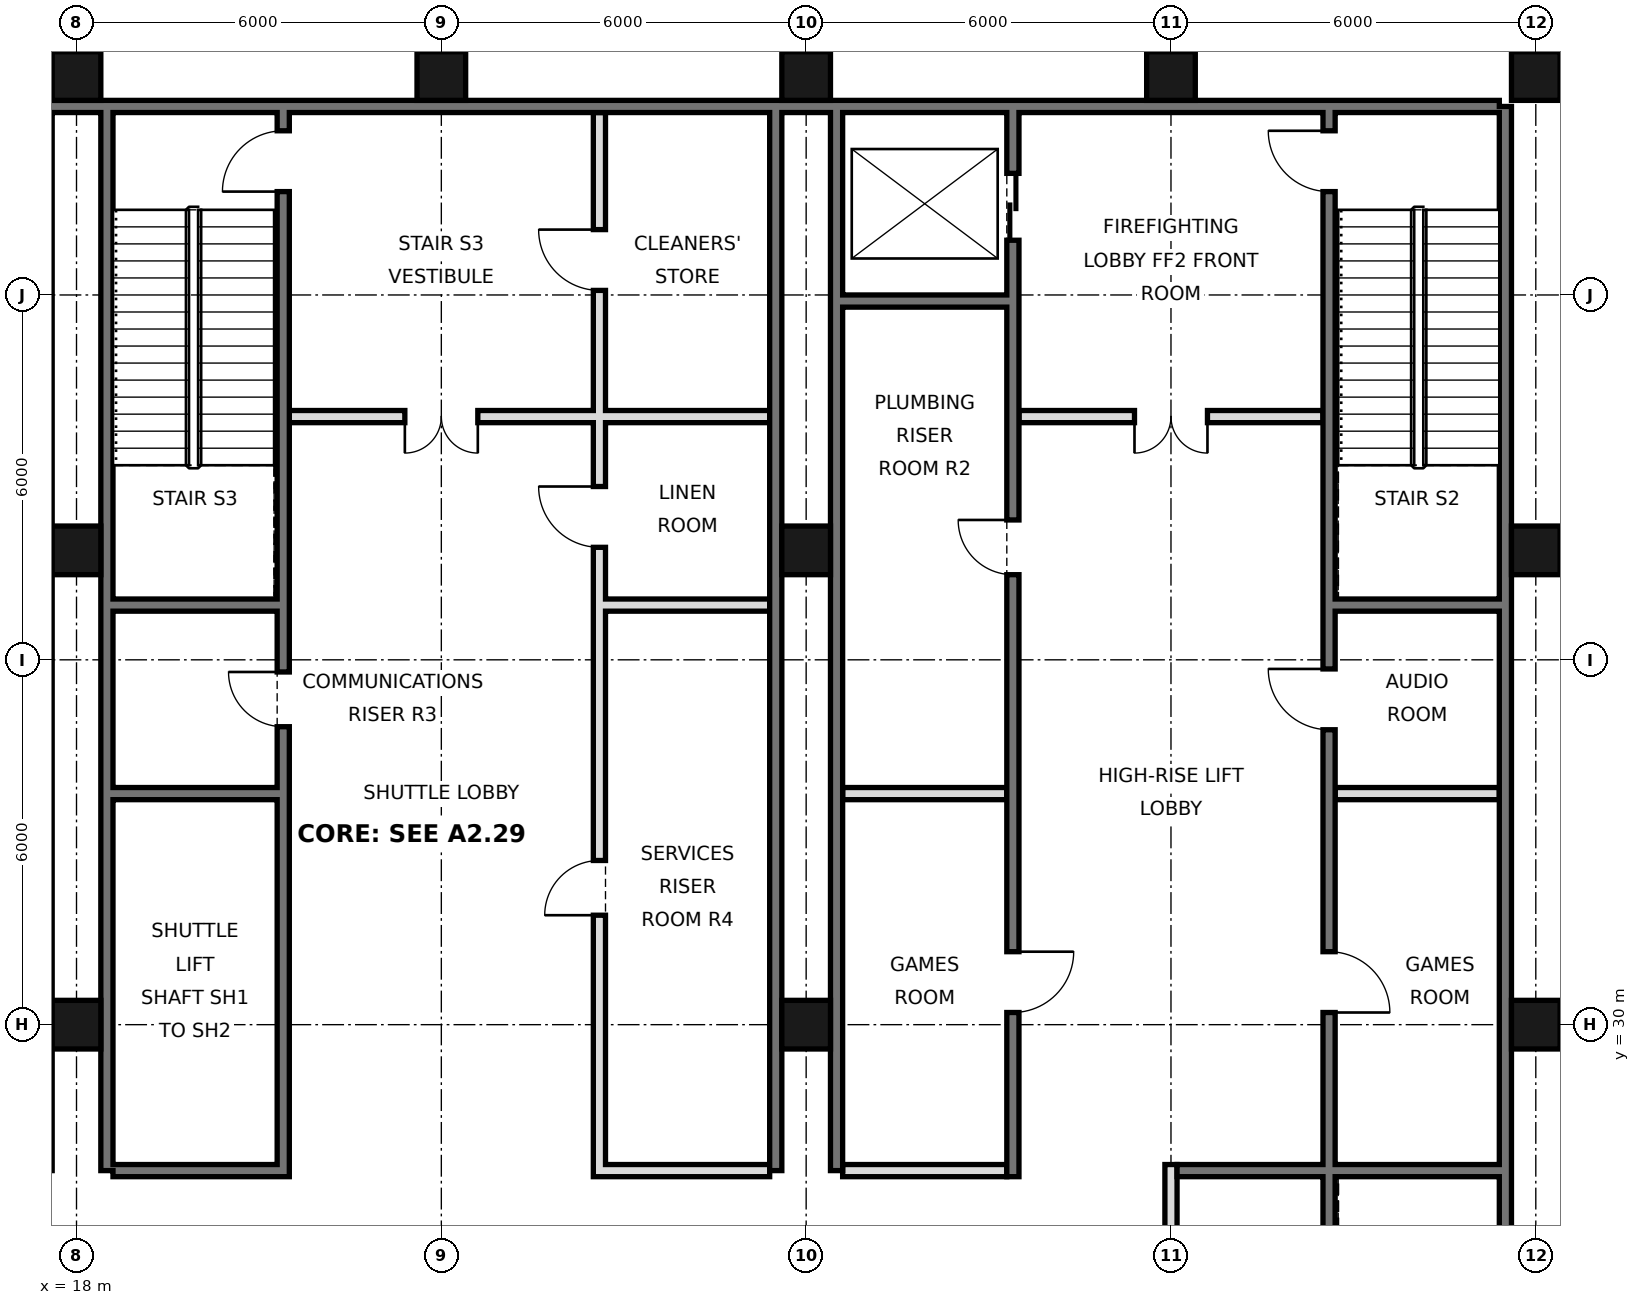
"""IFC4 building model, lengths in metres.
Left out: names, types, materials, properties, quantities, classifications, styles, units other than length and angle.
Written with IfcOpenShell. Run it as: python <this file> out.ifc"""

import sys

from ifc_helpers import new_model, si_unit, direction, frame, frame_2d, origin, origin_2d, place, context, subcontext, project, spatial, rectangle, hollow_rectangle, extrude, element, fill, save


model = new_model("IFC4")
c1 = context("Model", 3, precision=1e-05, world=origin(), true_north=direction((0.0, 1.0)))
c2 = subcontext(c1, "Body", "Model", "MODEL_VIEW")
j1 = project(units=[si_unit("LENGTHUNIT", "METRE"), si_unit("PLANEANGLEUNIT", "RADIAN")], contexts=[c1])
p1 = place(None, origin())
s1 = spatial("IfcSite", under=j1, at=p1, CompositionType="ELEMENT")
p2 = place(p1, origin())
s2 = spatial("IfcBuilding", under=s1, at=p2, CompositionType="ELEMENT")
p3 = place(p2, frame((0.0, 0.0, 114.2)))
s3 = spatial("IfcBuildingStorey", under=s2, at=p3, CompositionType="ELEMENT", Elevation=114.2)
for number, where, z_axis, x_axis in (
    (1, (18.0, 30.0, 0.0), (0.0, 0.0, 1.0), (1.0, 0.0, 0.0)),
    (2, (18.0, 37.8, 0.0), (0.0, 0.0, 1.0), (1.0, 0.0, 0.0)),
    (3, (18.0, 45.6, 0.0), (0.0, 0.0, 1.0), (1.0, 0.0, 0.0)),
    (4, (24.0, 45.6, 0.0), (0.0, 0.0, 1.0), (1.0, 0.0, 0.0)),
    (5, (30.0, 30.0, 0.0), (0.0, 0.0, 1.0), (1.0, 0.0, 0.0)),
    (6, (30.0, 37.8, 0.0), (0.0, 0.0, 1.0), (1.0, 0.0, 0.0)),
    (7, (30.0, 45.6, 0.0), (0.0, 0.0, 1.0), (1.0, 0.0, 0.0)),
    (8, (36.0, 45.6, 0.0), (0.0, 0.0, 1.0), (1.0, 0.0, 0.0)),
    (9, (42.0, 30.0, 0.0), (0.0, 0.0, 1.0), (1.0, 0.0, 0.0)),
    (10, (42.0, 37.8, 0.0), (0.0, 0.0, 1.0), (1.0, 0.0, 0.0)),
    (11, (42.0, 45.6, 0.0), (0.0, 0.0, 1.0), (1.0, 0.0, 0.0)),
):
    element("IfcColumn", number, at=place(p3, frame(where, z_axis=z_axis, x_axis=x_axis)), inside=s3, PredefinedType="COLUMN", context=c2, shape_type="SweptSolid", body=[
        extrude(hollow_rectangle(XDim=0.8, YDim=0.8, WallThickness=0.05, at=origin_2d()), origin(), (0.0, 0.0, 1.0), 5.4),
    ])
p4 = place(p3, frame((41.5, 21.6, 0.0), z_axis=(0.0, 0.0, 1.0), x_axis=(0.0, 1.0, 0.0)))
e12 = element("IfcWall", 12, at=p4, inside=s3, PredefinedType="SOLIDWALL", context=c2, shape_type="SweptSolid", body=[
    extrude(rectangle(XDim=23.5, YDim=0.2, at=frame_2d((11.75, 0.0))), origin(), (0.0, 0.0, 1.0), 5.22),
])
p5 = place(p3, frame((6.6, 45.1, 0.0), z_axis=(0.0, 0.0, 1.0), x_axis=(1.0, 0.0, 0.0)))
e13 = element("IfcWall", 13, at=p5, inside=s3, PredefinedType="SOLIDWALL", context=c2, shape_type="SweptSolid", body=[
    extrude(rectangle(XDim=34.8, YDim=0.2, at=frame_2d((17.4, 0.0))), origin(), (0.0, 0.0, 1.0), 5.22),
])
for number, where, z_axis, x_axis in (
    (14, (18.5, 27.6, 0.0), (0.0, 0.0, 1.0), (0.0, 1.0, 0.0)),
    (15, (29.5, 27.6, 0.0), (0.0, 0.0, 1.0), (0.0, 1.0, 0.0)),
    (16, (30.5, 27.6, 0.0), (0.0, 0.0, 1.0), (0.0, 1.0, 0.0)),
):
    element("IfcWall", number, at=place(p3, frame(where, z_axis=z_axis, x_axis=x_axis)), inside=s3, PredefinedType="SOLIDWALL", context=c2, shape_type="SweptSolid", body=[
        extrude(rectangle(XDim=17.5, YDim=0.2, at=frame_2d((8.75, 0.0))), origin(), (0.0, 0.0, 1.0), 5.22),
    ])
p6 = place(p3, frame((21.4, 27.5, 0.0), z_axis=(0.0, 0.0, 1.0), x_axis=(0.0, 1.0, 0.0)))
e17 = element("IfcWall", 17, at=p6, inside=s3, PredefinedType="SOLIDWALL", context=c2, shape_type="SweptSolid", body=[
    extrude(rectangle(XDim=17.5, YDim=0.2, at=frame_2d((8.75, 0.0))), origin(), (0.0, 0.0, 1.0), 5.22),
])
p7 = place(p6, frame((16.2, 0.0, 0.0)))
e18 = element("IfcOpeningElement", 18, at=p7, cuts=e17, PredefinedType="OPENING", context=c2, shape_type="SweptSolid", body=[
    extrude(rectangle(XDim=1.0, YDim=2.1, at=frame_2d((0.5, 1.05))), frame((0.0, 0.11, 0.0), z_axis=(0.0, -1.0, 0.0), x_axis=(1.0, 0.0, 0.0)), (0.0, 0.0, 1.0), 0.22),
])
p8 = place(p6, frame((7.4, 0.0, 0.0)))
e19 = element("IfcOpeningElement", 19, at=p8, cuts=e17, PredefinedType="OPENING", context=c2, shape_type="SweptSolid", body=[
    extrude(rectangle(XDim=0.9, YDim=2.1, at=frame_2d((0.45, 1.05))), frame((0.0, 0.11, 0.0), z_axis=(0.0, -1.0, 0.0), x_axis=(1.0, 0.0, 0.0)), (0.0, 0.0, 1.0), 0.22),
])
p9 = place(p3, frame((26.6, 27.5, 0.0), z_axis=(0.0, 0.0, 1.0), x_axis=(0.0, 1.0, 0.0)))
e20 = element("IfcWall", 20, at=p9, inside=s3, PredefinedType="SOLIDWALL", context=c2, shape_type="SweptSolid", body=[
    extrude(rectangle(XDim=17.5, YDim=0.2, at=frame_2d((8.75, 0.0))), origin(), (0.0, 0.0, 1.0), 5.22),
])
p10 = place(p9, frame((4.3, 0.0, 0.0)))
e21 = element("IfcOpeningElement", 21, at=p10, cuts=e20, PredefinedType="OPENING", context=c2, shape_type="SweptSolid", body=[
    extrude(rectangle(XDim=0.9, YDim=2.1, at=frame_2d((0.45, 1.05))), frame((0.0, 0.11, 0.0), z_axis=(0.0, -1.0, 0.0), x_axis=(1.0, 0.0, 0.0)), (0.0, 0.0, 1.0), 0.22),
])
p11 = place(p9, frame((10.35, 0.0, 0.0)))
e22 = element("IfcOpeningElement", 22, at=p11, cuts=e20, PredefinedType="OPENING", context=c2, shape_type="SweptSolid", body=[
    extrude(rectangle(XDim=1.0, YDim=2.1, at=frame_2d((0.5, 1.05))), frame((0.0, 0.11, 0.0), z_axis=(0.0, -1.0, 0.0), x_axis=(1.0, 0.0, 0.0)), (0.0, 0.0, 1.0), 0.22),
])
p12 = place(p9, frame((14.575, 0.0, 0.0)))
e23 = element("IfcOpeningElement", 23, at=p12, cuts=e20, PredefinedType="OPENING", context=c2, shape_type="SweptSolid", body=[
    extrude(rectangle(XDim=1.0, YDim=2.1, at=frame_2d((0.5, 1.05))), frame((0.0, 0.11, 0.0), z_axis=(0.0, -1.0, 0.0), x_axis=(1.0, 0.0, 0.0)), (0.0, 0.0, 1.0), 0.22),
])
p13 = place(p3, frame((33.4, 27.5, 0.0), z_axis=(0.0, 0.0, 1.0), x_axis=(0.0, 1.0, 0.0)))
e24 = element("IfcWall", 24, at=p13, inside=s3, PredefinedType="SOLIDWALL", context=c2, shape_type="SweptSolid", body=[
    extrude(rectangle(XDim=17.5, YDim=0.2, at=frame_2d((8.75, 0.0))), origin(), (0.0, 0.0, 1.0), 5.22),
])
p14 = place(p13, frame((15.4, 0.0, 0.0)))
e25 = element("IfcOpeningElement", 25, at=p14, cuts=e24, PredefinedType="OPENING", context=c2, shape_type="SweptSolid", body=[
    extrude(rectangle(XDim=1.1, YDim=2.1, at=frame_2d((0.55, 1.05))), frame((0.0, 0.11, 0.0), z_axis=(0.0, -1.0, 0.0), x_axis=(1.0, 0.0, 0.0)), (0.0, 0.0, 1.0), 0.22),
])
p15 = place(p13, frame((2.7, 0.0, 0.0)))
e26 = element("IfcOpeningElement", 26, at=p15, cuts=e24, PredefinedType="OPENING", context=c2, shape_type="SweptSolid", body=[
    extrude(rectangle(XDim=1.0, YDim=2.1, at=frame_2d((0.5, 1.05))), frame((0.0, 0.11, 0.0), z_axis=(0.0, -1.0, 0.0), x_axis=(1.0, 0.0, 0.0)), (0.0, 0.0, 1.0), 0.22),
])
p16 = place(p13, frame((9.9, 0.0, 0.0)))
e27 = element("IfcOpeningElement", 27, at=p16, cuts=e24, PredefinedType="OPENING", context=c2, shape_type="SweptSolid", body=[
    extrude(rectangle(XDim=0.9, YDim=2.1, at=frame_2d((0.45, 1.05))), frame((0.0, 0.11, 0.0), z_axis=(0.0, -1.0, 0.0), x_axis=(1.0, 0.0, 0.0)), (0.0, 0.0, 1.0), 0.22),
])
p17 = place(p3, frame((36.0, 21.6, 0.0), z_axis=(0.0, 0.0, 1.0), x_axis=(0.0, 1.0, 0.0)))
e28 = element("IfcWall", 28, at=p17, inside=s3, PredefinedType="PARTITIONING", context=c2, shape_type="SweptSolid", body=[
    extrude(rectangle(XDim=6.1, YDim=0.2, at=frame_2d((3.05, 0.0))), origin(), (0.0, 0.0, 1.0), 5.22),
])
p18 = place(p3, frame((38.6, 21.6, 0.0), z_axis=(0.0, 0.0, 1.0), x_axis=(0.0, 1.0, 0.0)))
e29 = element("IfcWall", 29, at=p18, inside=s3, PredefinedType="SOLIDWALL", context=c2, shape_type="SweptSolid", body=[
    extrude(rectangle(XDim=23.4, YDim=0.2, at=frame_2d((11.7, 0.0))), origin(), (0.0, 0.0, 1.0), 5.22),
])
p19 = place(p18, frame((8.6, 0.0, 0.0)))
e30 = element("IfcOpeningElement", 30, at=p19, cuts=e29, PredefinedType="OPENING", context=c2, shape_type="SweptSolid", body=[
    extrude(rectangle(XDim=1.0, YDim=2.1, at=frame_2d((0.5, 1.05))), frame((0.0, 0.11, 0.0), z_axis=(0.0, -1.0, 0.0), x_axis=(1.0, 0.0, 0.0)), (0.0, 0.0, 1.0), 0.22),
])
p20 = place(p18, frame((13.25, 0.0, 0.0)))
e31 = element("IfcOpeningElement", 31, at=p20, cuts=e29, PredefinedType="OPENING", context=c2, shape_type="SweptSolid", body=[
    extrude(rectangle(XDim=1.0, YDim=2.1, at=frame_2d((0.5, 1.05))), frame((0.0, 0.11, 0.0), z_axis=(0.0, -1.0, 0.0), x_axis=(1.0, 0.0, 0.0)), (0.0, 0.0, 1.0), 0.22),
])
p21 = place(p18, frame((22.1, 0.0, 0.0)))
e32 = element("IfcOpeningElement", 32, at=p21, cuts=e29, PredefinedType="OPENING", context=c2, shape_type="SweptSolid", body=[
    extrude(rectangle(XDim=1.0, YDim=2.1, at=frame_2d((0.5, 1.05))), frame((0.0, 0.11, 0.0), z_axis=(0.0, -1.0, 0.0), x_axis=(1.0, 0.0, 0.0)), (0.0, 0.0, 1.0), 0.22),
])
p22 = place(p18, frame((0.175, 0.0, 0.0)))
e33 = element("IfcOpeningElement", 33, at=p22, cuts=e29, PredefinedType="OPENING", context=c2, shape_type="SweptSolid", body=[
    extrude(rectangle(XDim=0.9, YDim=2.1, at=frame_2d((0.45, 1.05))), frame((0.0, 0.11, 0.0), z_axis=(0.0, -1.0, 0.0), x_axis=(1.0, 0.0, 0.0)), (0.0, 0.0, 1.0), 0.22),
])
for number, where, z_axis, x_axis in (
    (34, (18.6, 27.6, 0.0), (0.0, 0.0, 1.0), (1.0, 0.0, 0.0)),
    (35, (26.7, 27.6, 0.0), (0.0, 0.0, 1.0), (1.0, 0.0, 0.0)),
):
    element("IfcWall", number, at=place(p3, frame(where, z_axis=z_axis, x_axis=x_axis)), inside=s3, PredefinedType="SOLIDWALL", context=c2, shape_type="SweptSolid", body=[
        extrude(rectangle(XDim=2.7, YDim=0.2, at=frame_2d((1.35, 0.0))), origin(), (0.0, 0.0, 1.0), 5.22),
    ])
p23 = place(p3, frame((30.6, 27.6, 0.0), z_axis=(0.0, 0.0, 1.0), x_axis=(1.0, 0.0, 0.0)))
e36 = element("IfcWall", 36, at=p23, inside=s3, PredefinedType="PARTITIONING", context=c2, shape_type="SweptSolid", body=[
    extrude(rectangle(XDim=2.7, YDim=0.2, at=frame_2d((1.35, 0.0))), origin(), (0.0, 0.0, 1.0), 5.22),
])
p24 = place(p3, frame((36.1, 27.6, 0.0), z_axis=(0.0, 0.0, 1.0), x_axis=(1.0, 0.0, 0.0)))
e37 = element("IfcWall", 37, at=p24, inside=s3, PredefinedType="SOLIDWALL", context=c2, shape_type="SweptSolid", body=[
    extrude(rectangle(XDim=5.3, YDim=0.2, at=frame_2d((2.65, 0.0))), origin(), (0.0, 0.0, 1.0), 5.22),
])
for number, where, z_axis, x_axis in (
    (38, (18.6, 33.8, 0.0), (0.0, 0.0, 1.0), (1.0, 0.0, 0.0)),
    (39, (30.6, 33.8, 0.0), (0.0, 0.0, 1.0), (1.0, 0.0, 0.0)),
):
    element("IfcWall", number, at=place(p3, frame(where, z_axis=z_axis, x_axis=x_axis)), inside=s3, PredefinedType="SOLIDWALL", context=c2, shape_type="SweptSolid", body=[
        extrude(rectangle(XDim=2.7, YDim=0.2, at=frame_2d((1.35, 0.0))), origin(), (0.0, 0.0, 1.0), 5.22),
    ])
p25 = place(p3, frame((38.7, 33.8, 0.0), z_axis=(0.0, 0.0, 1.0), x_axis=(1.0, 0.0, 0.0)))
e40 = element("IfcWall", 40, at=p25, inside=s3, PredefinedType="PARTITIONING", context=c2, shape_type="SweptSolid", body=[
    extrude(rectangle(XDim=2.7, YDim=0.2, at=frame_2d((1.35, 0.0))), origin(), (0.0, 0.0, 1.0), 5.22),
])
for number, where, z_axis, x_axis in (
    (41, (18.6, 36.9, 0.0), (0.0, 0.0, 1.0), (1.0, 0.0, 0.0)),
    (42, (26.7, 36.9, 0.0), (0.0, 0.0, 1.0), (1.0, 0.0, 0.0)),
    (43, (38.7, 36.9, 0.0), (0.0, 0.0, 1.0), (1.0, 0.0, 0.0)),
):
    element("IfcWall", number, at=place(p3, frame(where, z_axis=z_axis, x_axis=x_axis)), inside=s3, PredefinedType="SOLIDWALL", context=c2, shape_type="SweptSolid", body=[
        extrude(rectangle(XDim=2.7, YDim=0.2, at=frame_2d((1.35, 0.0))), origin(), (0.0, 0.0, 1.0), 5.22),
    ])
p26 = place(p3, frame((21.5, 40.0, 0.0), z_axis=(0.0, 0.0, 1.0), x_axis=(1.0, 0.0, 0.0)))
e44 = element("IfcWall", 44, at=p26, inside=s3, PredefinedType="PARTITIONING", context=c2, shape_type="SweptSolid", body=[
    extrude(rectangle(XDim=7.9, YDim=0.2, at=frame_2d((3.95, 0.0))), origin(), (0.0, 0.0, 1.0), 5.22),
])
p27 = place(p26, frame((1.9, 0.0, 0.0)))
e45 = element("IfcOpeningElement", 45, at=p27, cuts=e44, PredefinedType="OPENING", context=c2, shape_type="SweptSolid", body=[
    extrude(rectangle(XDim=1.2, YDim=2.1, at=frame_2d((0.6, 1.05))), frame((0.0, 0.11, 0.0), z_axis=(0.0, -1.0, 0.0), x_axis=(1.0, 0.0, 0.0)), (0.0, 0.0, 1.0), 0.22),
])
p28 = place(p3, frame((33.5, 40.0, 0.0), z_axis=(0.0, 0.0, 1.0), x_axis=(1.0, 0.0, 0.0)))
e46 = element("IfcWall", 46, at=p28, inside=s3, PredefinedType="PARTITIONING", context=c2, shape_type="SweptSolid", body=[
    extrude(rectangle(XDim=5.0, YDim=0.2, at=frame_2d((2.5, 0.0))), origin(), (0.0, 0.0, 1.0), 5.22),
])
p29 = place(p28, frame((1.9, 0.0, 0.0)))
e47 = element("IfcOpeningElement", 47, at=p29, cuts=e46, PredefinedType="OPENING", context=c2, shape_type="SweptSolid", body=[
    extrude(rectangle(XDim=1.2, YDim=2.1, at=frame_2d((0.6, 1.05))), frame((0.0, 0.11, 0.0), z_axis=(0.0, -1.0, 0.0), x_axis=(1.0, 0.0, 0.0)), (0.0, 0.0, 1.0), 0.22),
])
p30 = place(p3, frame((30.6, 41.9, 0.0), z_axis=(0.0, 0.0, 1.0), x_axis=(1.0, 0.0, 0.0)))
e48 = element("IfcWall", 48, at=p30, inside=s3, PredefinedType="SOLIDWALL", context=c2, shape_type="SweptSolid", body=[
    extrude(rectangle(XDim=2.7, YDim=0.2, at=frame_2d((1.35, 0.0))), origin(), (0.0, 0.0, 1.0), 5.22),
])
p31 = place(p27, frame((1.2, 0.0, 0.0), z_axis=(0.0, 0.0, 1.0), x_axis=(-1.0, 0.0, 0.0)))
e49 = element("IfcDoor", 49, at=p31, inside=s3, OperationType="DOUBLE_DOOR_SINGLE_SWING", PredefinedType="DOOR", context=c2, shape_type="SweptSolid", body=[
    extrude(rectangle(XDim=1.2, YDim=2.1, at=frame_2d((0.6, 1.05))), frame((0.0, 0.025, 0.0), z_axis=(0.0, -1.0, 0.0), x_axis=(1.0, 0.0, 0.0)), (0.0, 0.0, 1.0), 0.05),
])
fill(e45, e49)
p32 = place(p29, frame((1.2, 0.0, 0.0), z_axis=(0.0, 0.0, 1.0), x_axis=(-1.0, 0.0, 0.0)))
e50 = element("IfcDoor", 50, at=p32, inside=s3, OperationType="DOUBLE_DOOR_SINGLE_SWING", PredefinedType="DOOR", context=c2, shape_type="SweptSolid", body=[
    extrude(rectangle(XDim=1.2, YDim=2.1, at=frame_2d((0.6, 1.05))), frame((0.0, 0.025, 0.0), z_axis=(0.0, -1.0, 0.0), x_axis=(1.0, 0.0, 0.0)), (0.0, 0.0, 1.0), 0.05),
])
fill(e47, e50)
p33 = place(p14, origin())
e51 = element("IfcDoor", 51, at=p33, inside=s3, OperationType="DOUBLE_DOOR_SLIDING", PredefinedType="DOOR", context=c2, shape_type="SweptSolid", body=[
    extrude(rectangle(XDim=1.1, YDim=2.1, at=frame_2d((0.55, 1.05))), frame((0.0, 0.025, 0.0), z_axis=(0.0, -1.0, 0.0), x_axis=(1.0, 0.0, 0.0)), (0.0, 0.0, 1.0), 0.05),
])
fill(e25, e51)
p34 = place(p19, frame((1.0, 0.0, 0.0), z_axis=(0.0, 0.0, 1.0), x_axis=(-1.0, 0.0, 0.0)))
e52 = element("IfcDoor", 52, at=p34, inside=s3, OperationType="SINGLE_SWING_RIGHT", PredefinedType="DOOR", context=c2, shape_type="SweptSolid", body=[
    extrude(rectangle(XDim=1.0, YDim=2.1, at=frame_2d((0.5, 1.05))), frame((0.0, 0.025, 0.0), z_axis=(0.0, -1.0, 0.0), x_axis=(1.0, 0.0, 0.0)), (0.0, 0.0, 1.0), 0.05),
])
fill(e30, e52)
p35 = place(p20, frame((1.0, 0.0, 0.0), z_axis=(0.0, 0.0, 1.0), x_axis=(-1.0, 0.0, 0.0)))
e53 = element("IfcDoor", 53, at=p35, inside=s3, OperationType="SINGLE_SWING_LEFT", PredefinedType="DOOR", context=c2, shape_type="SweptSolid", body=[
    extrude(rectangle(XDim=1.0, YDim=2.1, at=frame_2d((0.5, 1.05))), frame((0.0, 0.025, 0.0), z_axis=(0.0, -1.0, 0.0), x_axis=(1.0, 0.0, 0.0)), (0.0, 0.0, 1.0), 0.05),
])
fill(e31, e53)
p36 = place(p15, origin())
e54 = element("IfcDoor", 54, at=p36, inside=s3, OperationType="SINGLE_SWING_RIGHT", PredefinedType="DOOR", context=c2, shape_type="SweptSolid", body=[
    extrude(rectangle(XDim=1.0, YDim=2.1, at=frame_2d((0.5, 1.05))), frame((0.0, 0.025, 0.0), z_axis=(0.0, -1.0, 0.0), x_axis=(1.0, 0.0, 0.0)), (0.0, 0.0, 1.0), 0.05),
])
fill(e26, e54)
p37 = place(p21, frame((1.0, 0.0, 0.0), z_axis=(0.0, 0.0, 1.0), x_axis=(-1.0, 0.0, 0.0)))
e55 = element("IfcDoor", 55, at=p37, inside=s3, OperationType="SINGLE_SWING_LEFT", PredefinedType="DOOR", context=c2, shape_type="SweptSolid", body=[
    extrude(rectangle(XDim=1.0, YDim=2.1, at=frame_2d((0.5, 1.05))), frame((0.0, 0.025, 0.0), z_axis=(0.0, -1.0, 0.0), x_axis=(1.0, 0.0, 0.0)), (0.0, 0.0, 1.0), 0.05),
])
fill(e32, e55)
p38 = place(p7, origin())
e56 = element("IfcDoor", 56, at=p38, inside=s3, OperationType="SINGLE_SWING_LEFT", PredefinedType="DOOR", context=c2, shape_type="SweptSolid", body=[
    extrude(rectangle(XDim=1.0, YDim=2.1, at=frame_2d((0.5, 1.05))), frame((0.0, 0.025, 0.0), z_axis=(0.0, -1.0, 0.0), x_axis=(1.0, 0.0, 0.0)), (0.0, 0.0, 1.0), 0.05),
])
fill(e18, e56)
p39 = place(p16, frame((0.9, 0.0, 0.0), z_axis=(0.0, 0.0, 1.0), x_axis=(-1.0, 0.0, 0.0)))
e57 = element("IfcDoor", 57, at=p39, inside=s3, OperationType="SINGLE_SWING_LEFT", PredefinedType="DOOR", context=c2, shape_type="SweptSolid", body=[
    extrude(rectangle(XDim=0.9, YDim=2.1, at=frame_2d((0.45, 1.05))), frame((0.0, 0.025, 0.0), z_axis=(0.0, -1.0, 0.0), x_axis=(1.0, 0.0, 0.0)), (0.0, 0.0, 1.0), 0.05),
])
fill(e27, e57)
p40 = place(p8, frame((0.9, 0.0, 0.0), z_axis=(0.0, 0.0, 1.0), x_axis=(-1.0, 0.0, 0.0)))
e58 = element("IfcDoor", 58, at=p40, inside=s3, OperationType="SINGLE_SWING_LEFT", PredefinedType="DOOR", context=c2, shape_type="SweptSolid", body=[
    extrude(rectangle(XDim=0.9, YDim=2.1, at=frame_2d((0.45, 1.05))), frame((0.0, 0.025, 0.0), z_axis=(0.0, -1.0, 0.0), x_axis=(1.0, 0.0, 0.0)), (0.0, 0.0, 1.0), 0.05),
])
fill(e19, e58)
p41 = place(p10, origin())
e59 = element("IfcDoor", 59, at=p41, inside=s3, OperationType="SINGLE_SWING_LEFT", PredefinedType="DOOR", context=c2, shape_type="SweptSolid", body=[
    extrude(rectangle(XDim=0.9, YDim=2.1, at=frame_2d((0.45, 1.05))), frame((0.0, 0.025, 0.0), z_axis=(0.0, -1.0, 0.0), x_axis=(1.0, 0.0, 0.0)), (0.0, 0.0, 1.0), 0.05),
])
fill(e21, e59)
p42 = place(p11, frame((1.0, 0.0, 0.0), z_axis=(0.0, 0.0, 1.0), x_axis=(-1.0, 0.0, 0.0)))
e60 = element("IfcDoor", 60, at=p42, inside=s3, OperationType="SINGLE_SWING_LEFT", PredefinedType="DOOR", context=c2, shape_type="SweptSolid", body=[
    extrude(rectangle(XDim=1.0, YDim=2.1, at=frame_2d((0.5, 1.05))), frame((0.0, 0.025, 0.0), z_axis=(0.0, -1.0, 0.0), x_axis=(1.0, 0.0, 0.0)), (0.0, 0.0, 1.0), 0.05),
])
fill(e22, e60)
p43 = place(p12, frame((1.0, 0.0, 0.0), z_axis=(0.0, 0.0, 1.0), x_axis=(-1.0, 0.0, 0.0)))
e61 = element("IfcDoor", 61, at=p43, inside=s3, OperationType="SINGLE_SWING_LEFT", PredefinedType="DOOR", context=c2, shape_type="SweptSolid", body=[
    extrude(rectangle(XDim=1.0, YDim=2.1, at=frame_2d((0.5, 1.05))), frame((0.0, 0.025, 0.0), z_axis=(0.0, -1.0, 0.0), x_axis=(1.0, 0.0, 0.0)), (0.0, 0.0, 1.0), 0.05),
])
fill(e23, e61)
save(model, sys.argv[1])
